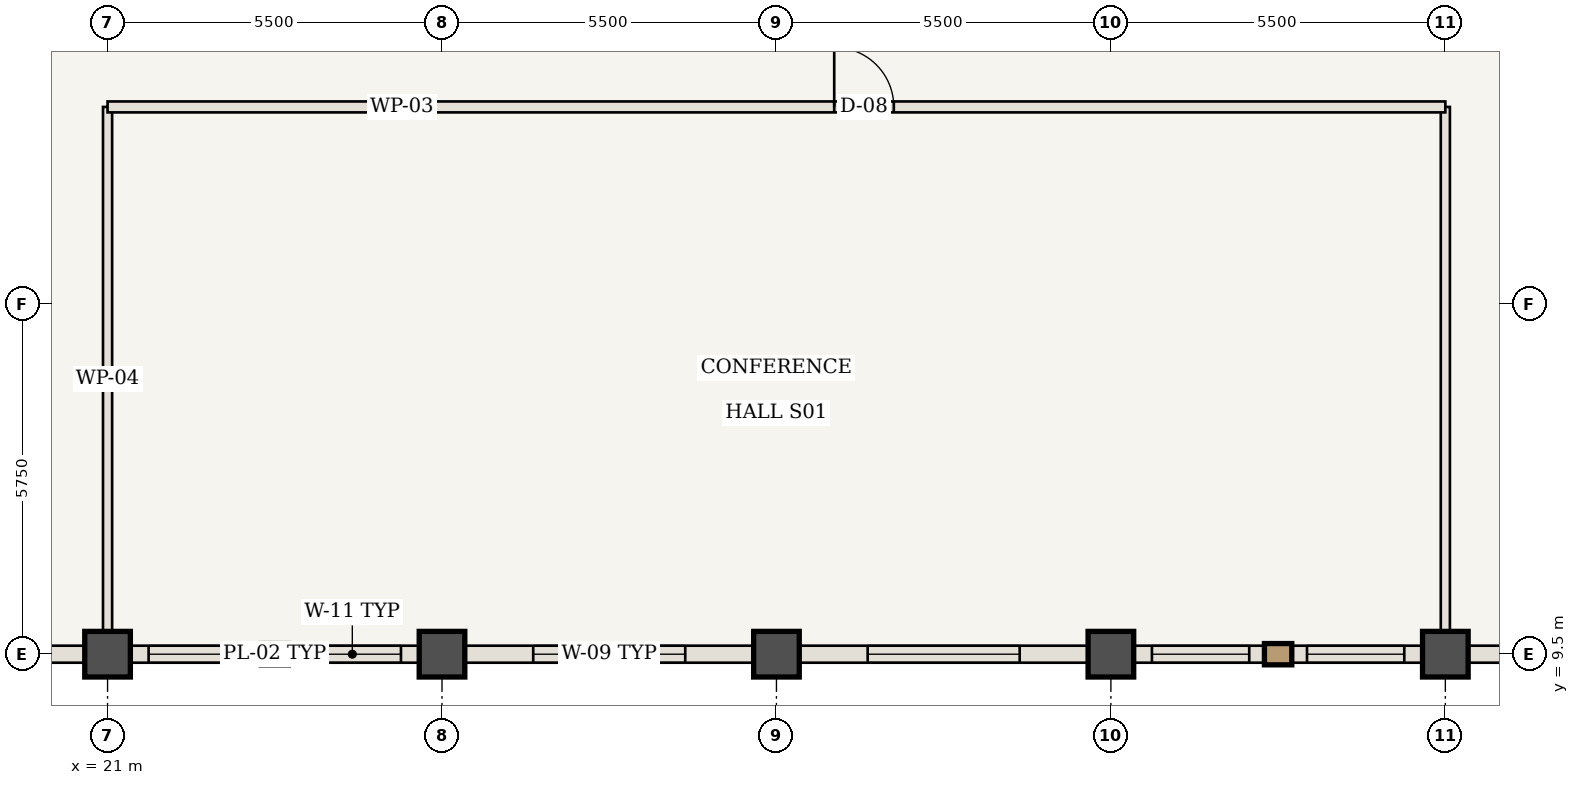
"""IFC4 building model, lengths in metres.
Left out: names, types, materials, properties, quantities, classifications, styles, units other than length and angle.
Written with IfcOpenShell. Run it as: python <this file> out.ifc"""

import sys

from ifc_helpers import new_model, si_unit, direction, frame, frame_2d, origin, origin_2d, place, context, subcontext, project, spatial, rectangle, extrude, element, fill, save


model = new_model("IFC4")
c1 = context("Model", 3, precision=1e-05, world=origin(), true_north=direction((0.0, 1.0)))
c2 = subcontext(c1, "Body", "Model", "MODEL_VIEW")
j1 = project(units=[si_unit("LENGTHUNIT", "METRE"), si_unit("PLANEANGLEUNIT", "RADIAN")], contexts=[c1])
p1 = place(None, origin())
s1 = spatial("IfcSite", under=j1, at=p1, CompositionType="ELEMENT")
p2 = place(p1, origin())
s2 = spatial("IfcBuilding", under=s1, at=p2, CompositionType="ELEMENT")
p3 = place(p2, frame((0.0, 0.0, 277.55)))
s3 = spatial("IfcBuildingStorey", under=s2, at=p3, CompositionType="ELEMENT", Elevation=277.55)
for number, where, z_axis, x_axis in (
    (1, (21.0, 9.5, 0.0), (0.0, 0.0, 1.0), (1.0, 0.0, 0.0)),
    (2, (26.5, 9.5, 0.0), (0.0, 0.0, 1.0), (1.0, 0.0, 0.0)),
    (3, (32.0, 9.5, 0.0), (0.0, 0.0, 1.0), (1.0, 0.0, 0.0)),
    (4, (37.5, 9.5, 0.0), (0.0, 0.0, 1.0), (1.0, 0.0, 0.0)),
    (5, (43.0, 9.5, 0.0), (0.0, 0.0, 1.0), (1.0, 0.0, 0.0)),
):
    element("IfcColumn", number, at=place(p3, frame(where, z_axis=z_axis, x_axis=x_axis)), inside=s3, PredefinedType="COLUMN", context=c2, shape_type="SweptSolid", body=[
        extrude(rectangle(XDim=0.75, YDim=0.75, at=origin_2d()), origin(), (0.0, 0.0, 1.0), 3.85),
    ])
for number, where, z_axis, x_axis in (
    (6, (21.0, 9.56, 0.0), (0.0, 0.0, 1.0), (0.0, 1.0, 0.0)),
    (7, (43.0, 9.56, 0.0), (0.0, 0.0, 1.0), (0.0, 1.0, 0.0)),
):
    element("IfcWall", number, at=place(p3, frame(where, z_axis=z_axis, x_axis=x_axis)), inside=s3, PredefinedType="STANDARD", context=c2, shape_type="SweptSolid", body=[
        extrude(rectangle(XDim=8.94, YDim=0.15, at=frame_2d((4.47, 0.0))), origin(), (0.0, 0.0, 1.0), 3.685),
    ])
p4 = place(p3, frame((21.0, 18.5, 0.0), z_axis=(0.0, 0.0, 1.0), x_axis=(1.0, 0.0, 0.0)))
e8 = element("IfcWall", 8, at=p4, inside=s3, PredefinedType="STANDARD", context=c2, shape_type="SweptSolid", body=[
    extrude(rectangle(XDim=22.0, YDim=0.18, at=frame_2d((11.0, 0.0))), origin(), (0.0, 0.0, 1.0), 3.685),
])
p5 = place(p4, frame((11.95, 0.0, 0.0)))
e9 = element("IfcOpeningElement", 9, at=p5, cuts=e8, PredefinedType="OPENING", context=c2, shape_type="SweptSolid", body=[
    extrude(rectangle(XDim=0.98, YDim=2.2, at=frame_2d((0.49, 1.1))), frame((0.0, 0.1, 0.0), z_axis=(0.0, -1.0, 0.0), x_axis=(1.0, 0.0, 0.0)), (0.0, 0.0, 1.0), 0.2),
])
p6 = place(p3, frame((21.0, 9.5, 0.0), z_axis=(0.0, 0.0, 1.0), x_axis=(-1.0, 0.0, 0.0)))
e10 = element("IfcWall", 10, at=p6, inside=s3, PredefinedType="USERDEFINED", context=c2, shape_type="SweptSolid", body=[
    extrude(rectangle(XDim=5.5, YDim=0.28, at=frame_2d((2.75, 0.0))), origin(), (0.0, 0.0, 1.0), 2.985),
])
p7 = place(p3, frame((26.5, 9.5, 0.0), z_axis=(0.0, 0.0, 1.0), x_axis=(-1.0, 0.0, 0.0)))
e11 = element("IfcWall", 11, at=p7, inside=s3, PredefinedType="USERDEFINED", context=c2, shape_type="SweptSolid", body=[
    extrude(rectangle(XDim=5.5, YDim=0.28, at=frame_2d((2.75, 0.0))), origin(), (0.0, 0.0, 1.0), 2.985),
])
p8 = place(p7, frame((0.675, 0.0, 0.85)))
e12 = element("IfcOpeningElement", 12, at=p8, cuts=e11, PredefinedType="OPENING", context=c2, shape_type="SweptSolid", body=[
    extrude(rectangle(XDim=1.6, YDim=1.935, at=frame_2d((0.8, 0.968))), frame((0.0, 0.15, 0.0), z_axis=(0.0, -1.0, 0.0), x_axis=(1.0, 0.0, 0.0)), (0.0, 0.0, 1.0), 0.3),
])
p9 = place(p7, frame((3.225, 0.0, 0.85)))
e13 = element("IfcOpeningElement", 13, at=p9, cuts=e11, PredefinedType="OPENING", context=c2, shape_type="SweptSolid", body=[
    extrude(rectangle(XDim=1.6, YDim=1.935, at=frame_2d((0.8, 0.968))), frame((0.0, 0.15, 0.0), z_axis=(0.0, -1.0, 0.0), x_axis=(1.0, 0.0, 0.0)), (0.0, 0.0, 1.0), 0.3),
])
p10 = place(p3, frame((32.0, 9.5, 0.0), z_axis=(0.0, 0.0, 1.0), x_axis=(-1.0, 0.0, 0.0)))
e14 = element("IfcWall", 14, at=p10, inside=s3, PredefinedType="USERDEFINED", context=c2, shape_type="SweptSolid", body=[
    extrude(rectangle(XDim=5.5, YDim=0.28, at=frame_2d((2.75, 0.0))), origin(), (0.0, 0.0, 1.0), 2.985),
])
p11 = place(p10, frame((1.5, 0.0, 0.85)))
e15 = element("IfcOpeningElement", 15, at=p11, cuts=e14, PredefinedType="OPENING", context=c2, shape_type="SweptSolid", body=[
    extrude(rectangle(XDim=2.5, YDim=1.935, at=frame_2d((1.25, 0.968))), frame((0.0, 0.15, 0.0), z_axis=(0.0, -1.0, 0.0), x_axis=(1.0, 0.0, 0.0)), (0.0, 0.0, 1.0), 0.3),
])
p12 = place(p3, frame((37.5, 9.5, 0.0), z_axis=(0.0, 0.0, 1.0), x_axis=(-1.0, 0.0, 0.0)))
e16 = element("IfcWall", 16, at=p12, inside=s3, PredefinedType="USERDEFINED", context=c2, shape_type="SweptSolid", body=[
    extrude(rectangle(XDim=5.5, YDim=0.28, at=frame_2d((2.75, 0.0))), origin(), (0.0, 0.0, 1.0), 2.985),
])
p13 = place(p12, frame((1.5, 0.0, 0.85)))
e17 = element("IfcOpeningElement", 17, at=p13, cuts=e16, PredefinedType="OPENING", context=c2, shape_type="SweptSolid", body=[
    extrude(rectangle(XDim=2.5, YDim=1.935, at=frame_2d((1.25, 0.968))), frame((0.0, 0.15, 0.0), z_axis=(0.0, -1.0, 0.0), x_axis=(1.0, 0.0, 0.0)), (0.0, 0.0, 1.0), 0.3),
])
p14 = place(p3, frame((43.0, 9.5, 0.0), z_axis=(0.0, 0.0, 1.0), x_axis=(-1.0, 0.0, 0.0)))
e18 = element("IfcWall", 18, at=p14, inside=s3, PredefinedType="USERDEFINED", context=c2, shape_type="SweptSolid", body=[
    extrude(rectangle(XDim=5.5, YDim=0.28, at=frame_2d((2.75, 0.0))), origin(), (0.0, 0.0, 1.0), 2.985),
])
p15 = place(p14, frame((0.675, 0.0, 0.85)))
e19 = element("IfcOpeningElement", 19, at=p15, cuts=e18, PredefinedType="OPENING", context=c2, shape_type="SweptSolid", body=[
    extrude(rectangle(XDim=1.6, YDim=1.935, at=frame_2d((0.8, 0.968))), frame((0.0, 0.15, 0.0), z_axis=(0.0, -1.0, 0.0), x_axis=(1.0, 0.0, 0.0)), (0.0, 0.0, 1.0), 0.3),
])
p16 = place(p14, frame((3.225, 0.0, 0.85)))
e20 = element("IfcOpeningElement", 20, at=p16, cuts=e18, PredefinedType="OPENING", context=c2, shape_type="SweptSolid", body=[
    extrude(rectangle(XDim=1.6, YDim=1.935, at=frame_2d((0.8, 0.968))), frame((0.0, 0.15, 0.0), z_axis=(0.0, -1.0, 0.0), x_axis=(1.0, 0.0, 0.0)), (0.0, 0.0, 1.0), 0.3),
])
p17 = place(p3, frame((48.5, 9.5, 0.0), z_axis=(0.0, 0.0, 1.0), x_axis=(-1.0, 0.0, 0.0)))
e21 = element("IfcWall", 21, at=p17, inside=s3, PredefinedType="USERDEFINED", context=c2, shape_type="SweptSolid", body=[
    extrude(rectangle(XDim=5.5, YDim=0.28, at=frame_2d((2.75, 0.0))), origin(), (0.0, 0.0, 1.0), 2.985),
])
p18 = place(p5, origin())
e22 = element("IfcDoor", 22, at=p18, inside=s3, OperationType="SINGLE_SWING_LEFT", PredefinedType="DOOR", context=c2, shape_type="SweptSolid", body=[
    extrude(rectangle(XDim=0.98, YDim=2.2, at=frame_2d((0.49, 1.1))), frame((0.0, 0.025, 0.0), z_axis=(0.0, -1.0, 0.0), x_axis=(1.0, 0.0, 0.0)), (0.0, 0.0, 1.0), 0.05),
])
fill(e9, e22)
p19 = place(p8, origin())
e23 = element("IfcWindow", 23, at=p19, inside=s3, PartitioningType="SINGLE_PANEL", PredefinedType="WINDOW", context=c2, shape_type="SweptSolid", body=[
    extrude(rectangle(XDim=1.6, YDim=1.935, at=frame_2d((0.8, 0.968))), frame((0.0, 0.03, 0.0), z_axis=(0.0, -1.0, 0.0), x_axis=(1.0, 0.0, 0.0)), (0.0, 0.0, 1.0), 0.06),
])
fill(e12, e23)
p20 = place(p9, origin())
e24 = element("IfcWindow", 24, at=p20, inside=s3, PartitioningType="SINGLE_PANEL", PredefinedType="WINDOW", context=c2, shape_type="SweptSolid", body=[
    extrude(rectangle(XDim=1.6, YDim=1.935, at=frame_2d((0.8, 0.968))), frame((0.0, 0.03, 0.0), z_axis=(0.0, -1.0, 0.0), x_axis=(1.0, 0.0, 0.0)), (0.0, 0.0, 1.0), 0.06),
])
fill(e13, e24)
p21 = place(p11, origin())
e25 = element("IfcWindow", 25, at=p21, inside=s3, PartitioningType="SINGLE_PANEL", PredefinedType="WINDOW", context=c2, shape_type="SweptSolid", body=[
    extrude(rectangle(XDim=2.5, YDim=1.935, at=frame_2d((1.25, 0.968))), frame((0.0, 0.03, 0.0), z_axis=(0.0, -1.0, 0.0), x_axis=(1.0, 0.0, 0.0)), (0.0, 0.0, 1.0), 0.06),
])
fill(e15, e25)
p22 = place(p13, origin())
e26 = element("IfcWindow", 26, at=p22, inside=s3, PartitioningType="SINGLE_PANEL", PredefinedType="WINDOW", context=c2, shape_type="SweptSolid", body=[
    extrude(rectangle(XDim=2.5, YDim=1.935, at=frame_2d((1.25, 0.968))), frame((0.0, 0.03, 0.0), z_axis=(0.0, -1.0, 0.0), x_axis=(1.0, 0.0, 0.0)), (0.0, 0.0, 1.0), 0.06),
])
fill(e17, e26)
p23 = place(p15, origin())
e27 = element("IfcWindow", 27, at=p23, inside=s3, PartitioningType="SINGLE_PANEL", PredefinedType="WINDOW", context=c2, shape_type="SweptSolid", body=[
    extrude(rectangle(XDim=1.6, YDim=1.935, at=frame_2d((0.8, 0.968))), frame((0.0, 0.03, 0.0), z_axis=(0.0, -1.0, 0.0), x_axis=(1.0, 0.0, 0.0)), (0.0, 0.0, 1.0), 0.06),
])
fill(e19, e27)
p24 = place(p16, origin())
e28 = element("IfcWindow", 28, at=p24, inside=s3, PartitioningType="SINGLE_PANEL", PredefinedType="WINDOW", context=c2, shape_type="SweptSolid", body=[
    extrude(rectangle(XDim=1.6, YDim=1.935, at=frame_2d((0.8, 0.968))), frame((0.0, 0.03, 0.0), z_axis=(0.0, -1.0, 0.0), x_axis=(1.0, 0.0, 0.0)), (0.0, 0.0, 1.0), 0.06),
])
fill(e20, e28)
save(model, sys.argv[1])
